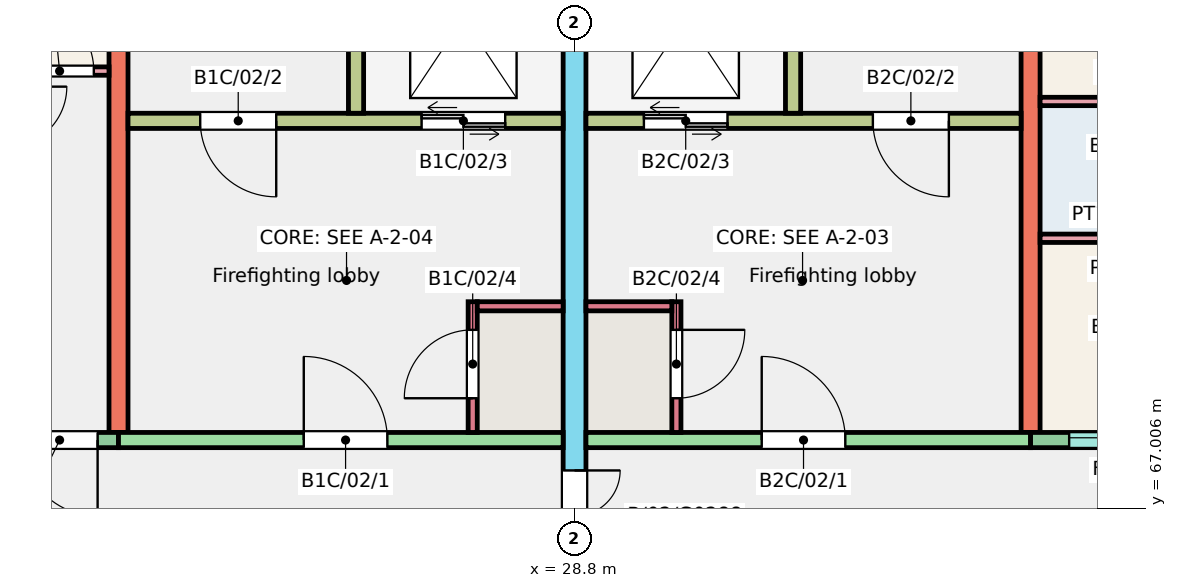
"""IFC4 building model, lengths in metres.
Left out: names, types, materials, properties, quantities, classifications, styles, units other than length and angle.
Written with IfcOpenShell. Run it as: python <this file> out.ifc"""

import sys

from ifc_helpers import new_model, si_unit, direction, frame, frame_2d, origin, place, context, subcontext, project, spatial, rectangle, extrude, element, fill, save


model = new_model("IFC4")
c1 = context("Model", 3, precision=1e-05, world=origin(), true_north=direction((0.0, 1.0)))
c2 = subcontext(c1, "Body", "Model", "MODEL_VIEW")
j1 = project(units=[si_unit("LENGTHUNIT", "METRE"), si_unit("PLANEANGLEUNIT", "RADIAN")], contexts=[c1])
p1 = place(None, origin())
s1 = spatial("IfcSite", under=j1, at=p1, CompositionType="ELEMENT")
p2 = place(p1, origin())
s2 = spatial("IfcBuilding", under=s1, at=p2, CompositionType="ELEMENT")
p3 = place(p2, frame((0.0, 0.0, 6.0)))
s3 = spatial("IfcBuildingStorey", under=s2, at=p3, CompositionType="ELEMENT", Elevation=6.0)
p4 = place(p3, frame((22.8, 68.0, 0.0), z_axis=(0.0, 0.0, 1.0), x_axis=(0.0, 1.0, 0.0)))
e1 = element("IfcWall", 1, at=p4, inside=s3, PredefinedType="SHEAR", context=c2, shape_type="SweptSolid", body=[
    extrude(rectangle(XDim=9.0, YDim=0.25, at=frame_2d((4.5, 0.0))), origin(), (0.0, 0.0, 1.0), 3.0),
])
p5 = place(p3, frame((28.8, 66.0, 0.0), z_axis=(0.0, 0.0, 1.0), x_axis=(0.0, 1.0, 0.0)))
e2 = element("IfcWall", 2, at=p5, inside=s3, PredefinedType="SHEAR", context=c2, shape_type="SweptSolid", body=[
    extrude(rectangle(XDim=11.0, YDim=0.3, at=frame_2d((5.5, 0.0))), origin(), (0.0, 0.0, 1.0), 3.0),
])
p6 = place(p5, frame((0.3, 0.0, 0.0)))
e3 = element("IfcOpeningElement", 3, at=p6, cuts=e2, PredefinedType="OPENING", context=c2, shape_type="SweptSolid", body=[
    extrude(rectangle(XDim=1.2, YDim=2.1, at=frame_2d((0.6, 1.05))), frame((0.0, 0.16, 0.0), z_axis=(0.0, -1.0, 0.0), x_axis=(1.0, 0.0, 0.0)), (0.0, 0.0, 1.0), 0.32),
])
p7 = place(p3, frame((34.8, 68.0, 0.0), z_axis=(0.0, 0.0, 1.0), x_axis=(0.0, 1.0, 0.0)))
e4 = element("IfcWall", 4, at=p7, inside=s3, PredefinedType="SHEAR", context=c2, shape_type="SweptSolid", body=[
    extrude(rectangle(XDim=9.0, YDim=0.25, at=frame_2d((4.5, 0.0))), origin(), (0.0, 0.0, 1.0), 3.0),
])
p8 = place(p3, frame((19.2, 67.9, 0.0), z_axis=(0.0, 0.0, 1.0), x_axis=(1.0, 0.0, 0.0)))
e5 = element("IfcWall", 5, at=p8, inside=s3, PredefinedType="SOLIDWALL", context=c2, shape_type="SweptSolid", body=[
    extrude(rectangle(XDim=3.6, YDim=0.2, at=frame_2d((1.8, 0.0))), origin(), (0.0, 0.0, 1.0), 3.0),
])
p9 = place(p8, frame((0.482, 0.0, 1.1)))
e6 = element("IfcOpeningElement", 6, at=p9, cuts=e5, PredefinedType="OPENING", context=c2, shape_type="SweptSolid", body=[
    extrude(rectangle(XDim=1.2, YDim=1.3, at=frame_2d((0.6, 0.65))), frame((0.0, 0.11, 0.0), z_axis=(0.0, -1.0, 0.0), x_axis=(1.0, 0.0, 0.0)), (0.0, 0.0, 1.0), 0.22),
])
p10 = place(p8, frame((2.325, 0.0, 0.0)))
e7 = element("IfcOpeningElement", 7, at=p10, cuts=e5, PredefinedType="OPENING", context=c2, shape_type="SweptSolid", body=[
    extrude(rectangle(XDim=1.0, YDim=2.1, at=frame_2d((0.5, 1.05))), frame((0.0, 0.11, 0.0), z_axis=(0.0, -1.0, 0.0), x_axis=(1.0, 0.0, 0.0)), (0.0, 0.0, 1.0), 0.22),
])
p11 = place(p3, frame((22.8, 67.9, 0.0), z_axis=(0.0, 0.0, 1.0), x_axis=(1.0, 0.0, 0.0)))
e8 = element("IfcWall", 8, at=p11, inside=s3, PredefinedType="SHEAR", context=c2, shape_type="SweptSolid", body=[
    extrude(rectangle(XDim=5.85, YDim=0.2, at=frame_2d((2.925, 0.0))), origin(), (0.0, 0.0, 1.0), 3.0),
])
p12 = place(p11, frame((2.438, 0.0, 0.0)))
e9 = element("IfcOpeningElement", 9, at=p12, cuts=e8, PredefinedType="OPENING", context=c2, shape_type="SweptSolid", body=[
    extrude(rectangle(XDim=1.1, YDim=2.1, at=frame_2d((0.55, 1.05))), frame((0.0, 0.11, 0.0), z_axis=(0.0, -1.0, 0.0), x_axis=(1.0, 0.0, 0.0)), (0.0, 0.0, 1.0), 0.22),
])
p13 = place(p3, frame((22.925, 72.1, 0.0), z_axis=(0.0, 0.0, 1.0), x_axis=(1.0, 0.0, 0.0)))
e10 = element("IfcWall", 10, at=p13, inside=s3, PredefinedType="SHEAR", context=c2, shape_type="SweptSolid", body=[
    extrude(rectangle(XDim=5.725, YDim=0.2, at=frame_2d((2.862, 0.0))), origin(), (0.0, 0.0, 1.0), 3.0),
])
p14 = place(p13, frame((0.95, 0.0, 0.0)))
e11 = element("IfcOpeningElement", 11, at=p14, cuts=e10, PredefinedType="OPENING", context=c2, shape_type="SweptSolid", body=[
    extrude(rectangle(XDim=1.0, YDim=2.1, at=frame_2d((0.5, 1.05))), frame((0.0, 0.11, 0.0), z_axis=(0.0, -1.0, 0.0), x_axis=(1.0, 0.0, 0.0)), (0.0, 0.0, 1.0), 0.22),
])
p15 = place(p13, frame((3.863, 0.0, 0.0)))
e12 = element("IfcOpeningElement", 12, at=p15, cuts=e10, PredefinedType="OPENING", context=c2, shape_type="SweptSolid", body=[
    extrude(rectangle(XDim=1.1, YDim=2.1, at=frame_2d((0.55, 1.05))), frame((0.0, 0.11, 0.0), z_axis=(0.0, -1.0, 0.0), x_axis=(1.0, 0.0, 0.0)), (0.0, 0.0, 1.0), 0.22),
])
p16 = place(p3, frame((25.925, 72.2, 0.0), z_axis=(0.0, 0.0, 1.0), x_axis=(0.0, 1.0, 0.0)))
e13 = element("IfcWall", 13, at=p16, inside=s3, PredefinedType="SHEAR", context=c2, shape_type="SweptSolid", body=[
    extrude(rectangle(XDim=4.8, YDim=0.2, at=frame_2d((2.4, 0.0))), origin(), (0.0, 0.0, 1.0), 3.0),
])
p17 = place(p3, frame((27.46, 68.0, 0.0), z_axis=(0.0, 0.0, 1.0), x_axis=(0.0, 1.0, 0.0)))
e14 = element("IfcWall", 14, at=p17, inside=s3, PredefinedType="SHEAR", context=c2, shape_type="SweptSolid", body=[
    extrude(rectangle(XDim=1.72, YDim=0.12, at=frame_2d((0.86, 0.0))), origin(), (0.0, 0.0, 1.0), 3.0),
])
p18 = place(p17, frame((0.45, 0.0, 0.0)))
e15 = element("IfcOpeningElement", 15, at=p18, cuts=e14, PredefinedType="OPENING", context=c2, shape_type="SweptSolid", body=[
    extrude(rectangle(XDim=0.9, YDim=2.1, at=frame_2d((0.45, 1.05))), frame((0.0, 0.07, 0.0), z_axis=(0.0, -1.0, 0.0), x_axis=(1.0, 0.0, 0.0)), (0.0, 0.0, 1.0), 0.14),
])
p19 = place(p3, frame((27.52, 69.66, 0.0), z_axis=(0.0, 0.0, 1.0), x_axis=(1.0, 0.0, 0.0)))
e16 = element("IfcWall", 16, at=p19, inside=s3, PredefinedType="SHEAR", context=c2, shape_type="SweptSolid", body=[
    extrude(rectangle(XDim=1.13, YDim=0.12, at=frame_2d((0.565, 0.0))), origin(), (0.0, 0.0, 1.0), 3.0),
])
p20 = place(p3, frame((28.95, 67.9, 0.0), z_axis=(0.0, 0.0, 1.0), x_axis=(1.0, 0.0, 0.0)))
e17 = element("IfcWall", 17, at=p20, inside=s3, PredefinedType="SHEAR", context=c2, shape_type="SweptSolid", body=[
    extrude(rectangle(XDim=5.85, YDim=0.2, at=frame_2d((2.925, 0.0))), origin(), (0.0, 0.0, 1.0), 3.0),
])
p21 = place(p20, frame((2.312, 0.0, 0.0)))
e18 = element("IfcOpeningElement", 18, at=p21, cuts=e17, PredefinedType="OPENING", context=c2, shape_type="SweptSolid", body=[
    extrude(rectangle(XDim=1.1, YDim=2.1, at=frame_2d((0.55, 1.05))), frame((0.0, 0.11, 0.0), z_axis=(0.0, -1.0, 0.0), x_axis=(1.0, 0.0, 0.0)), (0.0, 0.0, 1.0), 0.22),
])
p22 = place(p3, frame((28.95, 72.1, 0.0), z_axis=(0.0, 0.0, 1.0), x_axis=(1.0, 0.0, 0.0)))
e19 = element("IfcWall", 19, at=p22, inside=s3, PredefinedType="SHEAR", context=c2, shape_type="SweptSolid", body=[
    extrude(rectangle(XDim=5.725, YDim=0.2, at=frame_2d((2.863, 0.0))), origin(), (0.0, 0.0, 1.0), 3.0),
])
p23 = place(p22, frame((3.775, 0.0, 0.0)))
e20 = element("IfcOpeningElement", 20, at=p23, cuts=e19, PredefinedType="OPENING", context=c2, shape_type="SweptSolid", body=[
    extrude(rectangle(XDim=1.0, YDim=2.1, at=frame_2d((0.5, 1.05))), frame((0.0, 0.11, 0.0), z_axis=(0.0, -1.0, 0.0), x_axis=(1.0, 0.0, 0.0)), (0.0, 0.0, 1.0), 0.22),
])
p24 = place(p22, frame((0.762, 0.0, 0.0)))
e21 = element("IfcOpeningElement", 21, at=p24, cuts=e19, PredefinedType="OPENING", context=c2, shape_type="SweptSolid", body=[
    extrude(rectangle(XDim=1.1, YDim=2.1, at=frame_2d((0.55, 1.05))), frame((0.0, 0.11, 0.0), z_axis=(0.0, -1.0, 0.0), x_axis=(1.0, 0.0, 0.0)), (0.0, 0.0, 1.0), 0.22),
])
p25 = place(p3, frame((31.675, 72.2, 0.0), z_axis=(0.0, 0.0, 1.0), x_axis=(0.0, 1.0, 0.0)))
e22 = element("IfcWall", 22, at=p25, inside=s3, PredefinedType="SHEAR", context=c2, shape_type="SweptSolid", body=[
    extrude(rectangle(XDim=4.8, YDim=0.2, at=frame_2d((2.4, 0.0))), origin(), (0.0, 0.0, 1.0), 3.0),
])
p26 = place(p3, frame((30.14, 68.0, 0.0), z_axis=(0.0, 0.0, 1.0), x_axis=(0.0, 1.0, 0.0)))
e23 = element("IfcWall", 23, at=p26, inside=s3, PredefinedType="SHEAR", context=c2, shape_type="SweptSolid", body=[
    extrude(rectangle(XDim=1.72, YDim=0.12, at=frame_2d((0.86, 0.0))), origin(), (0.0, 0.0, 1.0), 3.0),
])
p27 = place(p26, frame((0.45, 0.0, 0.0)))
e24 = element("IfcOpeningElement", 24, at=p27, cuts=e23, PredefinedType="OPENING", context=c2, shape_type="SweptSolid", body=[
    extrude(rectangle(XDim=0.9, YDim=2.1, at=frame_2d((0.45, 1.05))), frame((0.0, 0.07, 0.0), z_axis=(0.0, -1.0, 0.0), x_axis=(1.0, 0.0, 0.0)), (0.0, 0.0, 1.0), 0.14),
])
p28 = place(p3, frame((28.95, 69.66, 0.0), z_axis=(0.0, 0.0, 1.0), x_axis=(1.0, 0.0, 0.0)))
e25 = element("IfcWall", 25, at=p28, inside=s3, PredefinedType="SHEAR", context=c2, shape_type="SweptSolid", body=[
    extrude(rectangle(XDim=1.13, YDim=0.12, at=frame_2d((0.565, 0.0))), origin(), (0.0, 0.0, 1.0), 3.0),
])
p29 = place(p3, frame((34.8, 67.9, 0.0), z_axis=(0.0, 0.0, 1.0), x_axis=(1.0, 0.0, 0.0)))
e26 = element("IfcWall", 26, at=p29, inside=s3, PredefinedType="SOLIDWALL", context=c2, shape_type="SweptSolid", body=[
    extrude(rectangle(XDim=3.6, YDim=0.2, at=frame_2d((1.8, 0.0))), origin(), (0.0, 0.0, 1.0), 3.0),
])
p30 = place(p29, frame((0.508, 0.0, 1.1)))
e27 = element("IfcOpeningElement", 27, at=p30, cuts=e26, PredefinedType="OPENING", context=c2, shape_type="SweptSolid", body=[
    extrude(rectangle(XDim=1.2, YDim=1.3, at=frame_2d((0.6, 0.65))), frame((0.0, 0.11, 0.0), z_axis=(0.0, -1.0, 0.0), x_axis=(1.0, 0.0, 0.0)), (0.0, 0.0, 1.0), 0.22),
])
p31 = place(p29, frame((2.35, 0.0, 0.0)))
e28 = element("IfcOpeningElement", 28, at=p31, cuts=e26, PredefinedType="OPENING", context=c2, shape_type="SweptSolid", body=[
    extrude(rectangle(XDim=1.0, YDim=2.1, at=frame_2d((0.5, 1.05))), frame((0.0, 0.11, 0.0), z_axis=(0.0, -1.0, 0.0), x_axis=(1.0, 0.0, 0.0)), (0.0, 0.0, 1.0), 0.22),
])
p32 = place(p3, frame((19.3, 72.755, 0.0), z_axis=(0.0, 0.0, 1.0), x_axis=(1.0, 0.0, 0.0)))
e29 = element("IfcWall", 29, at=p32, inside=s3, PredefinedType="PARTITIONING", context=c2, shape_type="SweptSolid", body=[
    extrude(rectangle(XDim=3.375, YDim=0.11, at=frame_2d((1.688, 0.0))), origin(), (0.0, 0.0, 1.0), 2.8),
])
p33 = place(p32, frame((2.275, 0.0, 0.0)))
e30 = element("IfcOpeningElement", 30, at=p33, cuts=e29, PredefinedType="OPENING", context=c2, shape_type="SweptSolid", body=[
    extrude(rectangle(XDim=0.9, YDim=2.1, at=frame_2d((0.45, 1.05))), frame((0.0, 0.065, 0.0), z_axis=(0.0, -1.0, 0.0), x_axis=(1.0, 0.0, 0.0)), (0.0, 0.0, 1.0), 0.13),
])
p34 = place(p3, frame((34.925, 70.555, 0.0), z_axis=(0.0, 0.0, 1.0), x_axis=(1.0, 0.0, 0.0)))
e31 = element("IfcWall", 31, at=p34, inside=s3, PredefinedType="PARTITIONING", context=c2, shape_type="SweptSolid", body=[
    extrude(rectangle(XDim=1.965, YDim=0.11, at=frame_2d((0.982, 0.0))), origin(), (0.0, 0.0, 1.0), 2.8),
])
p35 = place(p3, frame((34.925, 72.355, 0.0), z_axis=(0.0, 0.0, 1.0), x_axis=(1.0, 0.0, 0.0)))
e32 = element("IfcWall", 32, at=p35, inside=s3, PredefinedType="PARTITIONING", context=c2, shape_type="SweptSolid", body=[
    extrude(rectangle(XDim=3.375, YDim=0.11, at=frame_2d((1.688, 0.0))), origin(), (0.0, 0.0, 1.0), 2.8),
])
p36 = place(p35, frame((2.275, 0.0, 0.0)))
e33 = element("IfcOpeningElement", 33, at=p36, cuts=e32, PredefinedType="OPENING", context=c2, shape_type="SweptSolid", body=[
    extrude(rectangle(XDim=0.9, YDim=2.1, at=frame_2d((0.45, 1.05))), frame((0.0, 0.065, 0.0), z_axis=(0.0, -1.0, 0.0), x_axis=(1.0, 0.0, 0.0)), (0.0, 0.0, 1.0), 0.13),
])
p37 = place(p30, origin())
e34 = element("IfcWindow", 34, at=p37, inside=s3, PartitioningType="SINGLE_PANEL", PredefinedType="WINDOW", context=c2, shape_type="SweptSolid", body=[
    extrude(rectangle(XDim=1.2, YDim=1.3, at=frame_2d((0.6, 0.65))), frame((0.0, 0.06, 0.0), z_axis=(0.0, -1.0, 0.0), x_axis=(1.0, 0.0, 0.0)), (0.0, 0.0, 1.0), 0.06),
])
fill(e27, e34)
p38 = place(p10, origin())
e35 = element("IfcDoor", 35, at=p38, inside=s3, OperationType="SINGLE_SWING_RIGHT", PredefinedType="DOOR", context=c2, shape_type="SweptSolid", body=[
    extrude(rectangle(XDim=1.0, YDim=2.1, at=frame_2d((0.5, 1.05))), frame((0.0, 0.025, 0.0), z_axis=(0.0, -1.0, 0.0), x_axis=(1.0, 0.0, 0.0)), (0.0, 0.0, 1.0), 0.05),
])
fill(e7, e35)
p39 = place(p33, origin())
e36 = element("IfcDoor", 36, at=p39, inside=s3, OperationType="SINGLE_SWING_LEFT", PredefinedType="DOOR", context=c2, shape_type="SweptSolid", body=[
    extrude(rectangle(XDim=0.9, YDim=2.1, at=frame_2d((0.45, 1.05))), frame((0.0, 0.025, 0.0), z_axis=(0.0, -1.0, 0.0), x_axis=(1.0, 0.0, 0.0)), (0.0, 0.0, 1.0), 0.05),
])
fill(e30, e36)
p40 = place(p12, origin())
e37 = element("IfcDoor", 37, at=p40, inside=s3, OperationType="SINGLE_SWING_LEFT", PredefinedType="DOOR", context=c2, shape_type="SweptSolid", body=[
    extrude(rectangle(XDim=1.1, YDim=2.1, at=frame_2d((0.55, 1.05))), frame((0.0, 0.025, 0.0), z_axis=(0.0, -1.0, 0.0), x_axis=(1.0, 0.0, 0.0)), (0.0, 0.0, 1.0), 0.05),
])
fill(e9, e37)
p41 = place(p14, origin())
e38 = element("IfcDoor", 38, at=p41, inside=s3, OperationType="SINGLE_SWING_RIGHT", PredefinedType="DOOR", context=c2, shape_type="SweptSolid", body=[
    extrude(rectangle(XDim=1.0, YDim=2.1, at=frame_2d((0.5, 1.05))), frame((0.0, 0.025, 0.0), z_axis=(0.0, -1.0, 0.0), x_axis=(1.0, 0.0, 0.0)), (0.0, 0.0, 1.0), 0.05),
])
fill(e11, e38)
p42 = place(p15, origin())
e39 = element("IfcDoor", 39, at=p42, inside=s3, OperationType="DOUBLE_DOOR_SLIDING", PredefinedType="DOOR", context=c2, shape_type="SweptSolid", body=[
    extrude(rectangle(XDim=1.1, YDim=2.1, at=frame_2d((0.55, 1.05))), frame((0.0, 0.025, 0.0), z_axis=(0.0, -1.0, 0.0), x_axis=(1.0, 0.0, 0.0)), (0.0, 0.0, 1.0), 0.05),
])
fill(e12, e39)
p43 = place(p18, origin())
e40 = element("IfcDoor", 40, at=p43, inside=s3, OperationType="SINGLE_SWING_LEFT", PredefinedType="DOOR", context=c2, shape_type="SweptSolid", body=[
    extrude(rectangle(XDim=0.9, YDim=2.1, at=frame_2d((0.45, 1.05))), frame((0.0, 0.025, 0.0), z_axis=(0.0, -1.0, 0.0), x_axis=(1.0, 0.0, 0.0)), (0.0, 0.0, 1.0), 0.05),
])
fill(e15, e40)
p44 = place(p21, origin())
e41 = element("IfcDoor", 41, at=p44, inside=s3, OperationType="SINGLE_SWING_LEFT", PredefinedType="DOOR", context=c2, shape_type="SweptSolid", body=[
    extrude(rectangle(XDim=1.1, YDim=2.1, at=frame_2d((0.55, 1.05))), frame((0.0, 0.025, 0.0), z_axis=(0.0, -1.0, 0.0), x_axis=(1.0, 0.0, 0.0)), (0.0, 0.0, 1.0), 0.05),
])
fill(e18, e41)
p45 = place(p23, origin())
e42 = element("IfcDoor", 42, at=p45, inside=s3, OperationType="SINGLE_SWING_RIGHT", PredefinedType="DOOR", context=c2, shape_type="SweptSolid", body=[
    extrude(rectangle(XDim=1.0, YDim=2.1, at=frame_2d((0.5, 1.05))), frame((0.0, 0.025, 0.0), z_axis=(0.0, -1.0, 0.0), x_axis=(1.0, 0.0, 0.0)), (0.0, 0.0, 1.0), 0.05),
])
fill(e20, e42)
p46 = place(p24, origin())
e43 = element("IfcDoor", 43, at=p46, inside=s3, OperationType="DOUBLE_DOOR_SLIDING", PredefinedType="DOOR", context=c2, shape_type="SweptSolid", body=[
    extrude(rectangle(XDim=1.1, YDim=2.1, at=frame_2d((0.55, 1.05))), frame((0.0, 0.025, 0.0), z_axis=(0.0, -1.0, 0.0), x_axis=(1.0, 0.0, 0.0)), (0.0, 0.0, 1.0), 0.05),
])
fill(e21, e43)
p47 = place(p27, origin())
e44 = element("IfcDoor", 44, at=p47, inside=s3, OperationType="SINGLE_SWING_RIGHT", PredefinedType="DOOR", context=c2, shape_type="SweptSolid", body=[
    extrude(rectangle(XDim=0.9, YDim=2.1, at=frame_2d((0.45, 1.05))), frame((0.0, 0.025, 0.0), z_axis=(0.0, -1.0, 0.0), x_axis=(1.0, 0.0, 0.0)), (0.0, 0.0, 1.0), 0.05),
])
fill(e24, e44)
p48 = place(p6, origin())
e45 = element("IfcDoor", 45, at=p48, inside=s3, OperationType="DOUBLE_DOOR_SINGLE_SWING", PredefinedType="DOOR", context=c2, shape_type="SweptSolid", body=[
    extrude(rectangle(XDim=1.2, YDim=2.1, at=frame_2d((0.6, 1.05))), frame((0.0, 0.025, 0.0), z_axis=(0.0, -1.0, 0.0), x_axis=(1.0, 0.0, 0.0)), (0.0, 0.0, 1.0), 0.05),
])
fill(e3, e45)
save(model, sys.argv[1])
